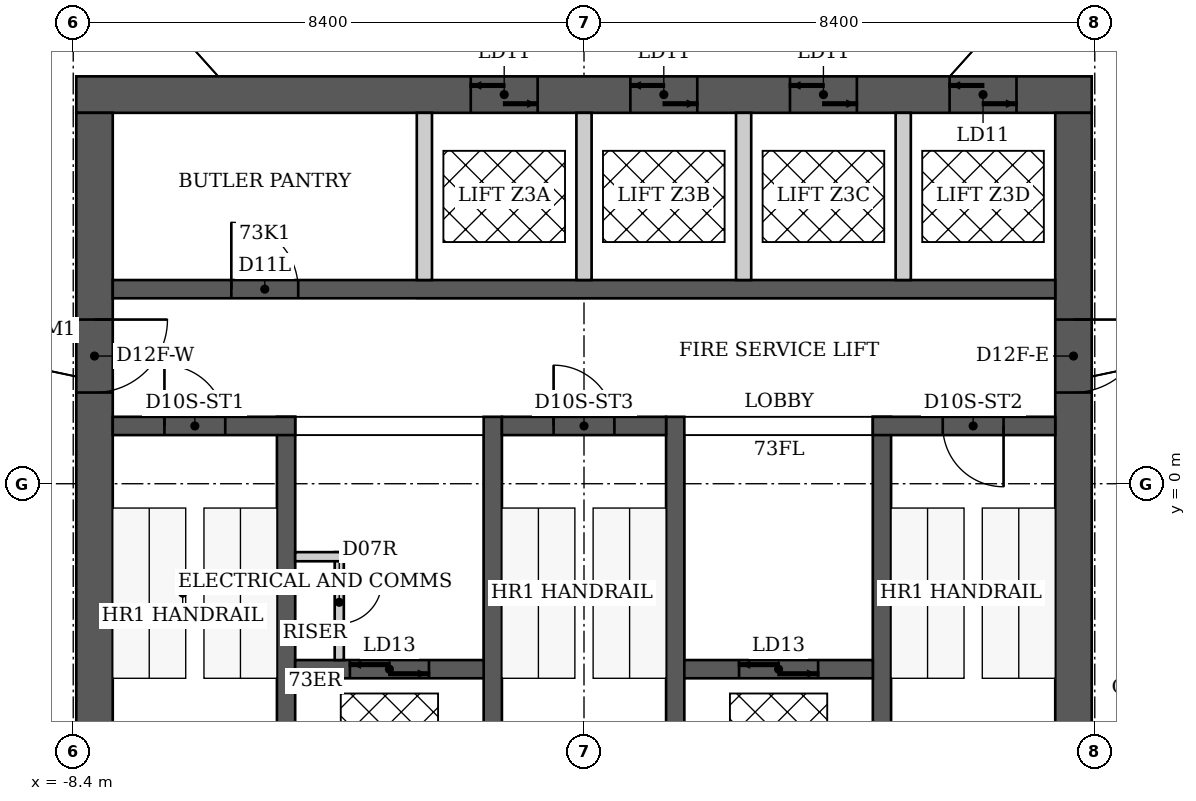
"""IFC4 building model, lengths in metres.
Left out: names, types, materials, properties, quantities, classifications, styles, units other than length and angle.
Written with IfcOpenShell. Run it as: python <this file> out.ifc"""

import sys

from ifc_helpers import new_model, si_unit, direction, frame, frame_2d, origin, place, context, subcontext, project, spatial, rectangle, extrude, element, fill, save


model = new_model("IFC4")
c1 = context("Model", 3, precision=1e-05, world=origin(), true_north=direction((0.0, 1.0)))
c2 = subcontext(c1, "Body", "Model", "MODEL_VIEW")
j1 = project(units=[si_unit("LENGTHUNIT", "METRE"), si_unit("PLANEANGLEUNIT", "RADIAN")], contexts=[c1])
p1 = place(None, origin())
s1 = spatial("IfcSite", under=j1, at=p1, CompositionType="ELEMENT")
p2 = place(p1, origin())
s2 = spatial("IfcBuilding", under=s1, at=p2, CompositionType="ELEMENT")
p3 = place(p2, frame((0.0, 0.0, 291.2)))
s3 = spatial("IfcBuildingStorey", under=s2, at=p3, CompositionType="ELEMENT", Elevation=291.2)
p4 = place(p3, frame((-8.35, 6.4, 0.0), z_axis=(0.0, 0.0, 1.0), x_axis=(1.0, 0.0, 0.0)))
e1 = element("IfcWall", 1, at=p4, inside=s3, PredefinedType="SHEAR", context=c2, shape_type="SweptSolid", body=[
    extrude(rectangle(XDim=16.7, YDim=0.6, at=frame_2d((8.35, 0.0))), origin(), (0.0, 0.0, 1.0), 3.8),
])
p5 = place(p4, frame((6.488, 0.0, 0.0)))
e2 = element("IfcOpeningElement", 2, at=p5, cuts=e1, PredefinedType="OPENING", context=c2, shape_type="SweptSolid", body=[
    extrude(rectangle(XDim=1.1, YDim=2.1, at=frame_2d((0.55, 1.05))), frame((0.0, 0.3, 0.0), z_axis=(0.0, -1.0, 0.0), x_axis=(1.0, 0.0, 0.0)), (0.0, 0.0, 1.0), 0.6),
])
p6 = place(p4, frame((9.113, 0.0, 0.0)))
e3 = element("IfcOpeningElement", 3, at=p6, cuts=e1, PredefinedType="OPENING", context=c2, shape_type="SweptSolid", body=[
    extrude(rectangle(XDim=1.1, YDim=2.1, at=frame_2d((0.55, 1.05))), frame((0.0, 0.3, 0.0), z_axis=(0.0, -1.0, 0.0), x_axis=(1.0, 0.0, 0.0)), (0.0, 0.0, 1.0), 0.6),
])
p7 = place(p4, frame((11.738, 0.0, 0.0)))
e4 = element("IfcOpeningElement", 4, at=p7, cuts=e1, PredefinedType="OPENING", context=c2, shape_type="SweptSolid", body=[
    extrude(rectangle(XDim=1.1, YDim=2.1, at=frame_2d((0.55, 1.05))), frame((0.0, 0.3, 0.0), z_axis=(0.0, -1.0, 0.0), x_axis=(1.0, 0.0, 0.0)), (0.0, 0.0, 1.0), 0.6),
])
p8 = place(p4, frame((14.363, 0.0, 0.0)))
e5 = element("IfcOpeningElement", 5, at=p8, cuts=e1, PredefinedType="OPENING", context=c2, shape_type="SweptSolid", body=[
    extrude(rectangle(XDim=1.1, YDim=2.1, at=frame_2d((0.55, 1.05))), frame((0.0, 0.3, 0.0), z_axis=(0.0, -1.0, 0.0), x_axis=(1.0, 0.0, 0.0)), (0.0, 0.0, 1.0), 0.6),
])
p9 = place(p3, frame((-8.05, -6.1, 0.0), z_axis=(0.0, 0.0, 1.0), x_axis=(0.0, 1.0, 0.0)))
e6 = element("IfcWall", 6, at=p9, inside=s3, PredefinedType="SHEAR", context=c2, shape_type="SweptSolid", body=[
    extrude(rectangle(XDim=12.2, YDim=0.6, at=frame_2d((6.1, 0.0))), origin(), (0.0, 0.0, 1.0), 3.8),
])
p10 = place(p9, frame((7.6, 0.0, 0.0)))
e7 = element("IfcOpeningElement", 7, at=p10, cuts=e6, PredefinedType="OPENING", context=c2, shape_type="SweptSolid", body=[
    extrude(rectangle(XDim=1.2, YDim=2.2, at=frame_2d((0.6, 1.1))), frame((0.0, 0.3, 0.0), z_axis=(0.0, -1.0, 0.0), x_axis=(1.0, 0.0, 0.0)), (0.0, 0.0, 1.0), 0.6),
])
p11 = place(p3, frame((8.05, -6.1, 0.0), z_axis=(0.0, 0.0, 1.0), x_axis=(0.0, 1.0, 0.0)))
e8 = element("IfcWall", 8, at=p11, inside=s3, PredefinedType="SHEAR", context=c2, shape_type="SweptSolid", body=[
    extrude(rectangle(XDim=12.2, YDim=0.6, at=frame_2d((6.1, 0.0))), origin(), (0.0, 0.0, 1.0), 3.8),
])
p12 = place(p11, frame((7.6, 0.0, 0.0)))
e9 = element("IfcOpeningElement", 9, at=p12, cuts=e8, PredefinedType="OPENING", context=c2, shape_type="SweptSolid", body=[
    extrude(rectangle(XDim=1.2, YDim=2.2, at=frame_2d((0.6, 1.1))), frame((0.0, 0.3, 0.0), z_axis=(0.0, -1.0, 0.0), x_axis=(1.0, 0.0, 0.0)), (0.0, 0.0, 1.0), 0.6),
])
for number, where, z_axis, x_axis in (
    (10, (-4.9, -6.1, 0.0), (0.0, 0.0, 1.0), (0.0, 1.0, 0.0)),
    (11, (-1.5, -6.1, 0.0), (0.0, 0.0, 1.0), (0.0, 1.0, 0.0)),
    (12, (1.5, -6.1, 0.0), (0.0, 0.0, 1.0), (0.0, 1.0, 0.0)),
    (13, (4.9, -6.1, 0.0), (0.0, 0.0, 1.0), (0.0, 1.0, 0.0)),
):
    element("IfcWall", number, at=place(p3, frame(where, z_axis=z_axis, x_axis=x_axis)), inside=s3, PredefinedType="SHEAR", context=c2, shape_type="SweptSolid", body=[
        extrude(rectangle(XDim=7.2, YDim=0.3, at=frame_2d((3.6, 0.0))), origin(), (0.0, 0.0, 1.0), 3.8),
    ])
p13 = place(p3, frame((-7.75, 0.95, 0.0), z_axis=(0.0, 0.0, 1.0), x_axis=(1.0, 0.0, 0.0)))
e14 = element("IfcWall", 14, at=p13, inside=s3, PredefinedType="SHEAR", context=c2, shape_type="SweptSolid", body=[
    extrude(rectangle(XDim=3.0, YDim=0.3, at=frame_2d((1.5, 0.0))), origin(), (0.0, 0.0, 1.0), 3.8),
])
p14 = place(p13, frame((0.85, 0.0, 0.0)))
e15 = element("IfcOpeningElement", 15, at=p14, cuts=e14, PredefinedType="OPENING", context=c2, shape_type="SweptSolid", body=[
    extrude(rectangle(XDim=1.0, YDim=2.2, at=frame_2d((0.5, 1.1))), frame((0.0, 0.15, 0.0), z_axis=(0.0, -1.0, 0.0), x_axis=(1.0, 0.0, 0.0)), (0.0, 0.0, 1.0), 0.3),
])
p15 = place(p3, frame((-1.35, 0.95, 0.0), z_axis=(0.0, 0.0, 1.0), x_axis=(1.0, 0.0, 0.0)))
e16 = element("IfcWall", 16, at=p15, inside=s3, PredefinedType="SHEAR", context=c2, shape_type="SweptSolid", body=[
    extrude(rectangle(XDim=2.7, YDim=0.3, at=frame_2d((1.35, 0.0))), origin(), (0.0, 0.0, 1.0), 3.8),
])
p16 = place(p15, frame((0.85, 0.0, 0.0)))
e17 = element("IfcOpeningElement", 17, at=p16, cuts=e16, PredefinedType="OPENING", context=c2, shape_type="SweptSolid", body=[
    extrude(rectangle(XDim=1.0, YDim=2.2, at=frame_2d((0.5, 1.1))), frame((0.0, 0.15, 0.0), z_axis=(0.0, -1.0, 0.0), x_axis=(1.0, 0.0, 0.0)), (0.0, 0.0, 1.0), 0.3),
])
p17 = place(p3, frame((4.75, 0.95, 0.0), z_axis=(0.0, 0.0, 1.0), x_axis=(1.0, 0.0, 0.0)))
e18 = element("IfcWall", 18, at=p17, inside=s3, PredefinedType="SHEAR", context=c2, shape_type="SweptSolid", body=[
    extrude(rectangle(XDim=3.0, YDim=0.3, at=frame_2d((1.5, 0.0))), origin(), (0.0, 0.0, 1.0), 3.8),
])
p18 = place(p17, frame((1.15, 0.0, 0.0)))
e19 = element("IfcOpeningElement", 19, at=p18, cuts=e18, PredefinedType="OPENING", context=c2, shape_type="SweptSolid", body=[
    extrude(rectangle(XDim=1.0, YDim=2.2, at=frame_2d((0.5, 1.1))), frame((0.0, 0.15, 0.0), z_axis=(0.0, -1.0, 0.0), x_axis=(1.0, 0.0, 0.0)), (0.0, 0.0, 1.0), 0.3),
])
p19 = place(p3, frame((-4.75, -3.05, 0.0), z_axis=(0.0, 0.0, 1.0), x_axis=(1.0, 0.0, 0.0)))
e20 = element("IfcWall", 20, at=p19, inside=s3, PredefinedType="SHEAR", context=c2, shape_type="SweptSolid", body=[
    extrude(rectangle(XDim=3.1, YDim=0.3, at=frame_2d((1.55, 0.0))), origin(), (0.0, 0.0, 1.0), 3.8),
])
p20 = place(p19, frame((0.9, 0.0, 0.0)))
e21 = element("IfcOpeningElement", 21, at=p20, cuts=e20, PredefinedType="OPENING", context=c2, shape_type="SweptSolid", body=[
    extrude(rectangle(XDim=1.3, YDim=2.1, at=frame_2d((0.65, 1.05))), frame((0.0, 0.15, 0.0), z_axis=(0.0, -1.0, 0.0), x_axis=(1.0, 0.0, 0.0)), (0.0, 0.0, 1.0), 0.3),
])
p21 = place(p3, frame((1.65, -3.05, 0.0), z_axis=(0.0, 0.0, 1.0), x_axis=(1.0, 0.0, 0.0)))
e22 = element("IfcWall", 22, at=p21, inside=s3, PredefinedType="SHEAR", context=c2, shape_type="SweptSolid", body=[
    extrude(rectangle(XDim=3.1, YDim=0.3, at=frame_2d((1.55, 0.0))), origin(), (0.0, 0.0, 1.0), 3.8),
])
p22 = place(p21, frame((0.9, 0.0, 0.0)))
e23 = element("IfcOpeningElement", 23, at=p22, cuts=e22, PredefinedType="OPENING", context=c2, shape_type="SweptSolid", body=[
    extrude(rectangle(XDim=1.3, YDim=2.1, at=frame_2d((0.65, 1.05))), frame((0.0, 0.15, 0.0), z_axis=(0.0, -1.0, 0.0), x_axis=(1.0, 0.0, 0.0)), (0.0, 0.0, 1.0), 0.3),
])
p23 = place(p3, frame((-7.75, 3.2, 0.0), z_axis=(0.0, 0.0, 1.0), x_axis=(1.0, 0.0, 0.0)))
e24 = element("IfcWall", 24, at=p23, inside=s3, PredefinedType="SHEAR", context=c2, shape_type="SweptSolid", body=[
    extrude(rectangle(XDim=15.5, YDim=0.3, at=frame_2d((7.75, 0.0))), origin(), (0.0, 0.0, 1.0), 3.8),
])
p24 = place(p23, frame((1.95, 0.0, 0.0)))
e25 = element("IfcOpeningElement", 25, at=p24, cuts=e24, PredefinedType="OPENING", context=c2, shape_type="SweptSolid", body=[
    extrude(rectangle(XDim=1.1, YDim=2.2, at=frame_2d((0.55, 1.1))), frame((0.0, 0.15, 0.0), z_axis=(0.0, -1.0, 0.0), x_axis=(1.0, 0.0, 0.0)), (0.0, 0.0, 1.0), 0.3),
])
for number, where, z_axis, x_axis in (
    (26, (-2.625, 3.35, 0.0), (0.0, 0.0, 1.0), (0.0, 1.0, 0.0)),
    (27, (0.0, 3.35, 0.0), (0.0, 0.0, 1.0), (0.0, 1.0, 0.0)),
    (28, (2.625, 3.35, 0.0), (0.0, 0.0, 1.0), (0.0, 1.0, 0.0)),
    (29, (5.25, 3.35, 0.0), (0.0, 0.0, 1.0), (0.0, 1.0, 0.0)),
):
    element("IfcWall", number, at=place(p3, frame(where, z_axis=z_axis, x_axis=x_axis)), inside=s3, PredefinedType="PARTITIONING", context=c2, shape_type="SweptSolid", body=[
        extrude(rectangle(XDim=2.75, YDim=0.25, at=frame_2d((1.375, 0.0))), origin(), (0.0, 0.0, 1.0), 3.8),
    ])
p25 = place(p3, frame((-11.73, -3.33, 0.0), z_axis=(0.0, 0.0, 1.0), x_axis=(0.499214067722, -0.866478686748, 0.0)))
e30 = element("IfcWall", 30, at=p25, inside=s3, PredefinedType="PARTITIONING", context=c2, shape_type="SweptSolid", body=[
    extrude(rectangle(XDim=8.413, YDim=0.2, at=frame_2d((4.207, 0.0))), origin(), (0.0, 0.0, 1.0), 3.64),
])
p26 = place(p25, frame((3.707, 0.0, 0.0)))
e31 = element("IfcOpeningElement", 31, at=p26, cuts=e30, PredefinedType="OPENING", context=c2, shape_type="SweptSolid", body=[
    extrude(rectangle(XDim=1.0, YDim=2.13, at=frame_2d((0.5, 1.065))), frame((0.0, 0.1, 0.0), z_axis=(0.0, -1.0, 0.0), x_axis=(1.0, 0.0, 0.0)), (0.0, 0.0, 1.0), 0.2),
])
p27 = place(p3, frame((8.75, -8.5, 0.0), z_axis=(0.0, 0.0, 1.0), x_axis=(0.500093981358, 0.865971136822, 0.0)))
e32 = element("IfcWall", 32, at=p27, inside=s3, PredefinedType="PARTITIONING", context=c2, shape_type="SweptSolid", body=[
    extrude(rectangle(XDim=8.418, YDim=0.2, at=frame_2d((4.209, 0.0))), origin(), (0.0, 0.0, 1.0), 3.64),
])
p28 = place(p27, frame((3.709, 0.0, 0.0)))
e33 = element("IfcOpeningElement", 33, at=p28, cuts=e32, PredefinedType="OPENING", context=c2, shape_type="SweptSolid", body=[
    extrude(rectangle(XDim=1.0, YDim=2.13, at=frame_2d((0.5, 1.065))), frame((0.0, 0.1, 0.0), z_axis=(0.0, -1.0, 0.0), x_axis=(1.0, 0.0, 0.0)), (0.0, 0.0, 1.0), 0.2),
])
p29 = place(p3, frame((-4.025, -2.9, 0.0), z_axis=(0.0, 0.0, 1.0), x_axis=(0.0, 1.0, 0.0)))
e34 = element("IfcWall", 34, at=p29, inside=s3, PredefinedType="PARTITIONING", context=c2, shape_type="SweptSolid", body=[
    extrude(rectangle(XDim=1.775, YDim=0.15, at=frame_2d((0.887, 0.0))), origin(), (0.0, 0.0, 1.0), 3.64),
])
p30 = place(p29, frame((0.6, 0.0, 0.0)))
e35 = element("IfcOpeningElement", 35, at=p30, cuts=e34, PredefinedType="OPENING", context=c2, shape_type="SweptSolid", body=[
    extrude(rectangle(XDim=0.7, YDim=2.1, at=frame_2d((0.35, 1.05))), frame((0.0, 0.075, 0.0), z_axis=(0.0, -1.0, 0.0), x_axis=(1.0, 0.0, 0.0)), (0.0, 0.0, 1.0), 0.15),
])
p31 = place(p3, frame((-4.75, -1.2, 0.0), z_axis=(0.0, 0.0, 1.0), x_axis=(1.0, 0.0, 0.0)))
e36 = element("IfcWall", 36, at=p31, inside=s3, PredefinedType="PARTITIONING", context=c2, shape_type="SweptSolid", body=[
    extrude(rectangle(XDim=0.8, YDim=0.15, at=frame_2d((0.4, 0.0))), origin(), (0.0, 0.0, 1.0), 3.64),
])
p32 = place(p14, origin())
e37 = element("IfcDoor", 37, at=p32, inside=s3, OperationType="SINGLE_SWING_LEFT", PredefinedType="DOOR", context=c2, shape_type="SweptSolid", body=[
    extrude(rectangle(XDim=1.0, YDim=2.2, at=frame_2d((0.5, 1.1))), frame((0.0, 0.025, 0.0), z_axis=(0.0, -1.0, 0.0), x_axis=(1.0, 0.0, 0.0)), (0.0, 0.0, 1.0), 0.05),
])
fill(e15, e37)
p33 = place(p16, origin())
e38 = element("IfcDoor", 38, at=p33, inside=s3, OperationType="SINGLE_SWING_LEFT", PredefinedType="DOOR", context=c2, shape_type="SweptSolid", body=[
    extrude(rectangle(XDim=1.0, YDim=2.2, at=frame_2d((0.5, 1.1))), frame((0.0, 0.025, 0.0), z_axis=(0.0, -1.0, 0.0), x_axis=(1.0, 0.0, 0.0)), (0.0, 0.0, 1.0), 0.05),
])
fill(e17, e38)
p34 = place(p18, origin())
e39 = element("IfcDoor", 39, at=p34, inside=s3, OperationType="SINGLE_SWING_RIGHT", PredefinedType="DOOR", context=c2, shape_type="SweptSolid", body=[
    extrude(rectangle(XDim=1.0, YDim=2.2, at=frame_2d((0.5, 1.1))), frame((0.0, 0.025, 0.0), z_axis=(0.0, -1.0, 0.0), x_axis=(1.0, 0.0, 0.0)), (0.0, 0.0, 1.0), 0.05),
])
fill(e19, e39)
p35 = place(p10, origin())
e40 = element("IfcDoor", 40, at=p35, inside=s3, OperationType="SINGLE_SWING_RIGHT", PredefinedType="DOOR", context=c2, shape_type="SweptSolid", body=[
    extrude(rectangle(XDim=1.2, YDim=2.2, at=frame_2d((0.6, 1.1))), frame((0.0, 0.025, 0.0), z_axis=(0.0, -1.0, 0.0), x_axis=(1.0, 0.0, 0.0)), (0.0, 0.0, 1.0), 0.05),
])
fill(e7, e40)
p36 = place(p12, origin())
e41 = element("IfcDoor", 41, at=p36, inside=s3, OperationType="SINGLE_SWING_RIGHT", PredefinedType="DOOR", context=c2, shape_type="SweptSolid", body=[
    extrude(rectangle(XDim=1.2, YDim=2.2, at=frame_2d((0.6, 1.1))), frame((0.0, 0.025, 0.0), z_axis=(0.0, -1.0, 0.0), x_axis=(1.0, 0.0, 0.0)), (0.0, 0.0, 1.0), 0.05),
])
fill(e9, e41)
p37 = place(p30, origin())
e42 = element("IfcDoor", 42, at=p37, inside=s3, OperationType="SINGLE_SWING_RIGHT", PredefinedType="DOOR", context=c2, shape_type="SweptSolid", body=[
    extrude(rectangle(XDim=0.7, YDim=2.1, at=frame_2d((0.35, 1.05))), frame((0.0, 0.025, 0.0), z_axis=(0.0, -1.0, 0.0), x_axis=(1.0, 0.0, 0.0)), (0.0, 0.0, 1.0), 0.05),
])
fill(e35, e42)
p38 = place(p24, origin())
e43 = element("IfcDoor", 43, at=p38, inside=s3, OperationType="SINGLE_SWING_LEFT", PredefinedType="DOOR", context=c2, shape_type="SweptSolid", body=[
    extrude(rectangle(XDim=1.1, YDim=2.2, at=frame_2d((0.55, 1.1))), frame((0.0, 0.025, 0.0), z_axis=(0.0, -1.0, 0.0), x_axis=(1.0, 0.0, 0.0)), (0.0, 0.0, 1.0), 0.05),
])
fill(e25, e43)
p39 = place(p5, origin())
e44 = element("IfcDoor", 44, at=p39, inside=s3, OperationType="DOUBLE_DOOR_SLIDING", PredefinedType="DOOR", context=c2, shape_type="SweptSolid", body=[
    extrude(rectangle(XDim=1.1, YDim=2.1, at=frame_2d((0.55, 1.05))), frame((0.0, 0.025, 0.0), z_axis=(0.0, -1.0, 0.0), x_axis=(1.0, 0.0, 0.0)), (0.0, 0.0, 1.0), 0.05),
])
fill(e2, e44)
p40 = place(p6, origin())
e45 = element("IfcDoor", 45, at=p40, inside=s3, OperationType="DOUBLE_DOOR_SLIDING", PredefinedType="DOOR", context=c2, shape_type="SweptSolid", body=[
    extrude(rectangle(XDim=1.1, YDim=2.1, at=frame_2d((0.55, 1.05))), frame((0.0, 0.025, 0.0), z_axis=(0.0, -1.0, 0.0), x_axis=(1.0, 0.0, 0.0)), (0.0, 0.0, 1.0), 0.05),
])
fill(e3, e45)
p41 = place(p7, origin())
e46 = element("IfcDoor", 46, at=p41, inside=s3, OperationType="DOUBLE_DOOR_SLIDING", PredefinedType="DOOR", context=c2, shape_type="SweptSolid", body=[
    extrude(rectangle(XDim=1.1, YDim=2.1, at=frame_2d((0.55, 1.05))), frame((0.0, 0.025, 0.0), z_axis=(0.0, -1.0, 0.0), x_axis=(1.0, 0.0, 0.0)), (0.0, 0.0, 1.0), 0.05),
])
fill(e4, e46)
p42 = place(p8, origin())
e47 = element("IfcDoor", 47, at=p42, inside=s3, OperationType="DOUBLE_DOOR_SLIDING", PredefinedType="DOOR", context=c2, shape_type="SweptSolid", body=[
    extrude(rectangle(XDim=1.1, YDim=2.1, at=frame_2d((0.55, 1.05))), frame((0.0, 0.025, 0.0), z_axis=(0.0, -1.0, 0.0), x_axis=(1.0, 0.0, 0.0)), (0.0, 0.0, 1.0), 0.05),
])
fill(e5, e47)
p43 = place(p20, origin())
e48 = element("IfcDoor", 48, at=p43, inside=s3, OperationType="DOUBLE_DOOR_SLIDING", PredefinedType="DOOR", context=c2, shape_type="SweptSolid", body=[
    extrude(rectangle(XDim=1.3, YDim=2.1, at=frame_2d((0.65, 1.05))), frame((0.0, 0.025, 0.0), z_axis=(0.0, -1.0, 0.0), x_axis=(1.0, 0.0, 0.0)), (0.0, 0.0, 1.0), 0.05),
])
fill(e21, e48)
p44 = place(p22, origin())
e49 = element("IfcDoor", 49, at=p44, inside=s3, OperationType="DOUBLE_DOOR_SLIDING", PredefinedType="DOOR", context=c2, shape_type="SweptSolid", body=[
    extrude(rectangle(XDim=1.3, YDim=2.1, at=frame_2d((0.65, 1.05))), frame((0.0, 0.025, 0.0), z_axis=(0.0, -1.0, 0.0), x_axis=(1.0, 0.0, 0.0)), (0.0, 0.0, 1.0), 0.05),
])
fill(e23, e49)
save(model, sys.argv[1])
